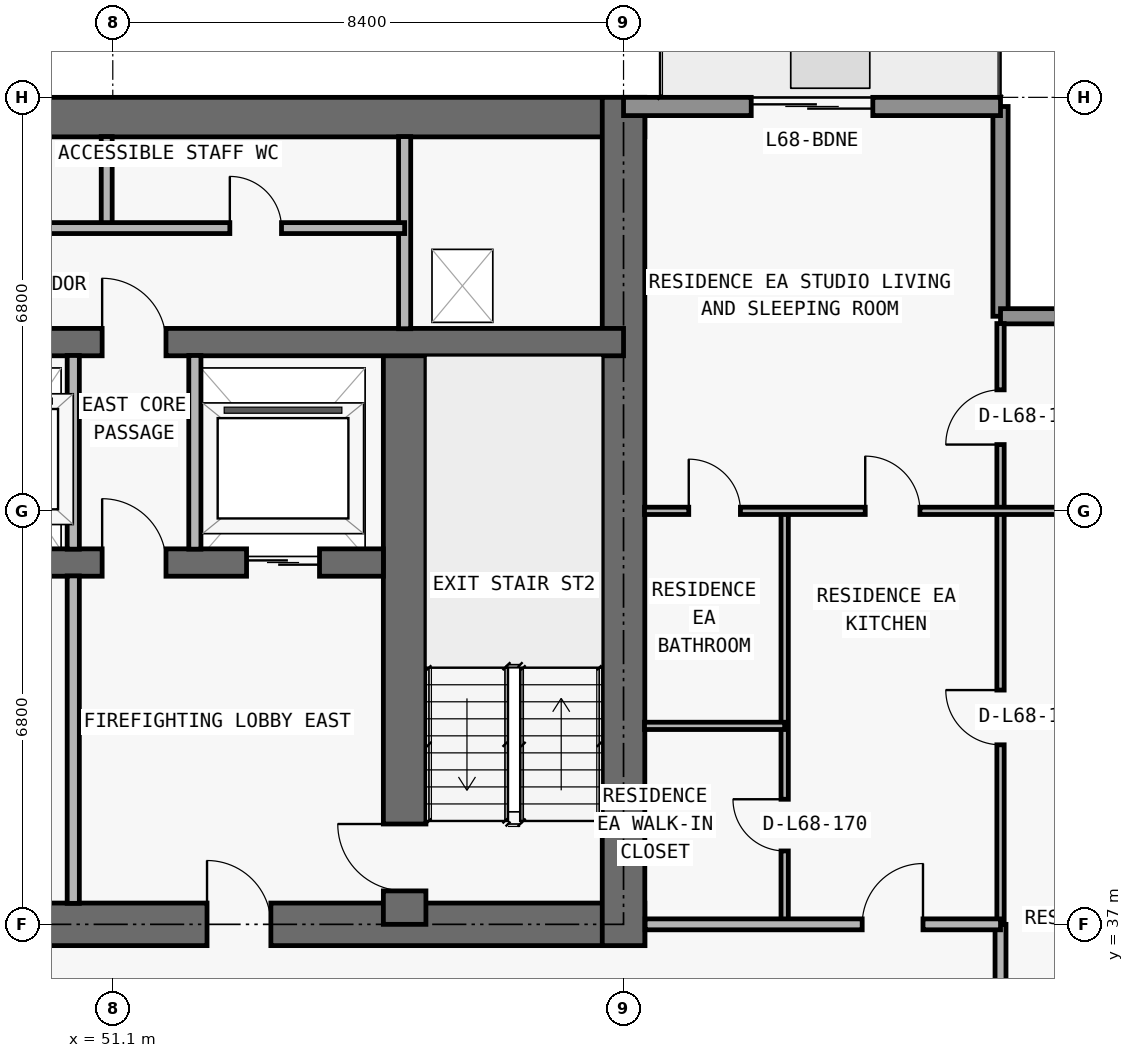
"""IFC4 building model, lengths in metres.
Left out: names, types, materials, properties, quantities, classifications, styles, units other than length and angle.
Written with IfcOpenShell. Run it as: python <this file> out.ifc"""

import sys

from ifc_helpers import new_model, si_unit, direction, frame, frame_2d, origin, place, context, subcontext, project, spatial, rectangle, extrude, element, fill, save


model = new_model("IFC4")
c1 = context("Model", 3, precision=1e-05, world=origin(), true_north=direction((0.0, 1.0)))
c2 = subcontext(c1, "Body", "Model", "MODEL_VIEW")
j1 = project(units=[si_unit("LENGTHUNIT", "METRE"), si_unit("PLANEANGLEUNIT", "RADIAN")], contexts=[c1])
p1 = place(None, origin())
s1 = spatial("IfcSite", under=j1, at=p1, CompositionType="ELEMENT")
p2 = place(p1, origin())
s2 = spatial("IfcBuilding", under=s1, at=p2, CompositionType="ELEMENT")
p3 = place(p2, frame((0.0, 0.0, 243.0)))
s3 = spatial("IfcBuildingStorey", under=s2, at=p3, CompositionType="ELEMENT", Elevation=243.0)
p4 = place(p3, frame((17.95, 37.0, 0.0), z_axis=(0.0, 0.0, 1.0), x_axis=(1.0, 0.0, 0.0)))
e1 = element("IfcWall", 1, at=p4, inside=s3, PredefinedType="SHEAR", context=c2, shape_type="SweptSolid", body=[
    extrude(rectangle(XDim=41.9, YDim=0.7, at=frame_2d((20.95, 0.0))), origin(), (0.0, 0.0, 1.0), 3.05),
])
p5 = place(p4, frame((14.35, 0.0, 0.0)))
e2 = element("IfcOpeningElement", 2, at=p5, cuts=e1, PredefinedType="OPENING", context=c2, shape_type="SweptSolid", body=[
    extrude(rectangle(XDim=1.1, YDim=2.15, at=frame_2d((0.55, 1.075))), frame((0.0, 0.36, 0.0), z_axis=(0.0, -1.0, 0.0), x_axis=(1.0, 0.0, 0.0)), (0.0, 0.0, 1.0), 0.72),
])
p6 = place(p4, frame((6.2, 0.0, 0.0)))
e3 = element("IfcOpeningElement", 3, at=p6, cuts=e1, PredefinedType="OPENING", context=c2, shape_type="SweptSolid", body=[
    extrude(rectangle(XDim=1.05, YDim=2.15, at=frame_2d((0.525, 1.075))), frame((0.0, 0.36, 0.0), z_axis=(0.0, -1.0, 0.0), x_axis=(1.0, 0.0, 0.0)), (0.0, 0.0, 1.0), 0.72),
])
p7 = place(p4, frame((34.7, 0.0, 0.0)))
e4 = element("IfcOpeningElement", 4, at=p7, cuts=e1, PredefinedType="OPENING", context=c2, shape_type="SweptSolid", body=[
    extrude(rectangle(XDim=1.05, YDim=2.15, at=frame_2d((0.525, 1.075))), frame((0.0, 0.36, 0.0), z_axis=(0.0, -1.0, 0.0), x_axis=(1.0, 0.0, 0.0)), (0.0, 0.0, 1.0), 0.72),
])
p8 = place(p4, frame((10.812, 0.0, 0.0)))
e5 = element("IfcOpeningElement", 5, at=p8, cuts=e1, PredefinedType="OPENING", context=c2, shape_type="SweptSolid", body=[
    extrude(rectangle(XDim=1.05, YDim=2.15, at=frame_2d((0.525, 1.075))), frame((0.0, 0.36, 0.0), z_axis=(0.0, -1.0, 0.0), x_axis=(1.0, 0.0, 0.0)), (0.0, 0.0, 1.0), 0.72),
])
p9 = place(p4, frame((24.05, 0.0, 0.0)))
e6 = element("IfcOpeningElement", 6, at=p9, cuts=e1, PredefinedType="OPENING", context=c2, shape_type="SweptSolid", body=[
    extrude(rectangle(XDim=1.05, YDim=2.15, at=frame_2d((0.525, 1.075))), frame((0.0, 0.36, 0.0), z_axis=(0.0, -1.0, 0.0), x_axis=(1.0, 0.0, 0.0)), (0.0, 0.0, 1.0), 0.72),
])
p10 = place(p3, frame((17.95, 50.275, 0.0), z_axis=(0.0, 0.0, 1.0), x_axis=(1.0, 0.0, 0.0)))
e7 = element("IfcWall", 7, at=p10, inside=s3, PredefinedType="SHEAR", context=c2, shape_type="SweptSolid", body=[
    extrude(rectangle(XDim=41.9, YDim=0.65, at=frame_2d((20.95, 0.0))), origin(), (0.0, 0.0, 1.0), 3.05),
])
p11 = place(p3, frame((59.5, 36.65, 0.0), z_axis=(0.0, 0.0, 1.0), x_axis=(0.0, 1.0, 0.0)))
e8 = element("IfcWall", 8, at=p11, inside=s3, PredefinedType="SHEAR", context=c2, shape_type="SweptSolid", body=[
    extrude(rectangle(XDim=13.95, YDim=0.7, at=frame_2d((6.975, 0.0))), origin(), (0.0, 0.0, 1.0), 3.05),
])
p12 = place(p3, frame((55.9, 37.0, 0.0), z_axis=(0.0, 0.0, 1.0), x_axis=(0.0, 1.0, 0.0)))
e9 = element("IfcWall", 9, at=p12, inside=s3, PredefinedType="SHEAR", context=c2, shape_type="SweptSolid", body=[
    extrude(rectangle(XDim=9.575, YDim=0.7, at=frame_2d((4.788, 0.0))), origin(), (0.0, 0.0, 1.0), 3.05),
])
p13 = place(p12, frame((0.55, 0.0, 0.0)))
e10 = element("IfcOpeningElement", 10, at=p13, cuts=e9, PredefinedType="OPENING", context=c2, shape_type="SweptSolid", body=[
    extrude(rectangle(XDim=1.1, YDim=2.15, at=frame_2d((0.55, 1.075))), frame((0.0, 0.36, 0.0), z_axis=(0.0, -1.0, 0.0), x_axis=(1.0, 0.0, 0.0)), (0.0, 0.0, 1.0), 0.72),
])
p14 = place(p3, frame((22.25, 42.95, 0.0), z_axis=(0.0, 0.0, 1.0), x_axis=(1.0, 0.0, 0.0)))
e11 = element("IfcWall", 11, at=p14, inside=s3, PredefinedType="SHEAR", context=c2, shape_type="SweptSolid", body=[
    extrude(rectangle(XDim=33.3, YDim=0.45, at=frame_2d((16.65, 0.0))), origin(), (0.0, 0.0, 1.0), 3.05),
])
p15 = place(p14, frame((1.05, 0.0, 0.0)))
e12 = element("IfcOpeningElement", 12, at=p15, cuts=e11, PredefinedType="OPENING", context=c2, shape_type="SweptSolid", body=[
    extrude(rectangle(XDim=1.2, YDim=2.2, at=frame_2d((0.6, 1.1))), frame((0.0, 0.235, 0.0), z_axis=(0.0, -1.0, 0.0), x_axis=(1.0, 0.0, 0.0)), (0.0, 0.0, 1.0), 0.47),
])
p16 = place(p14, frame((31.05, 0.0, 0.0)))
e13 = element("IfcOpeningElement", 13, at=p16, cuts=e11, PredefinedType="OPENING", context=c2, shape_type="SweptSolid", body=[
    extrude(rectangle(XDim=1.2, YDim=2.2, at=frame_2d((0.6, 1.1))), frame((0.0, 0.235, 0.0), z_axis=(0.0, -1.0, 0.0), x_axis=(1.0, 0.0, 0.0)), (0.0, 0.0, 1.0), 0.47),
])
p17 = place(p14, frame((26.45, 0.0, 0.0)))
e14 = element("IfcOpeningElement", 14, at=p17, cuts=e11, PredefinedType="OPENING", context=c2, shape_type="SweptSolid", body=[
    extrude(rectangle(XDim=1.1, YDim=2.2, at=frame_2d((0.55, 1.1))), frame((0.0, 0.235, 0.0), z_axis=(0.0, -1.0, 0.0), x_axis=(1.0, 0.0, 0.0)), (0.0, 0.0, 1.0), 0.47),
])
p18 = place(p14, frame((5.95, 0.0, 0.0)))
e15 = element("IfcOpeningElement", 15, at=p18, cuts=e11, PredefinedType="OPENING", context=c2, shape_type="SweptSolid", body=[
    extrude(rectangle(XDim=1.1, YDim=2.2, at=frame_2d((0.55, 1.1))), frame((0.0, 0.235, 0.0), z_axis=(0.0, -1.0, 0.0), x_axis=(1.0, 0.0, 0.0)), (0.0, 0.0, 1.0), 0.47),
])
p19 = place(p14, frame((3.625, 0.0, 0.0)))
e16 = element("IfcOpeningElement", 16, at=p19, cuts=e11, PredefinedType="OPENING", context=c2, shape_type="SweptSolid", body=[
    extrude(rectangle(XDim=1.05, YDim=2.15, at=frame_2d((0.525, 1.075))), frame((0.0, 0.235, 0.0), z_axis=(0.0, -1.0, 0.0), x_axis=(1.0, 0.0, 0.0)), (0.0, 0.0, 1.0), 0.47),
])
p20 = place(p14, frame((28.675, 0.0, 0.0)))
e17 = element("IfcOpeningElement", 17, at=p20, cuts=e11, PredefinedType="OPENING", context=c2, shape_type="SweptSolid", body=[
    extrude(rectangle(XDim=1.05, YDim=2.15, at=frame_2d((0.525, 1.075))), frame((0.0, 0.235, 0.0), z_axis=(0.0, -1.0, 0.0), x_axis=(1.0, 0.0, 0.0)), (0.0, 0.0, 1.0), 0.47),
])
p21 = place(p14, frame((14.7, 0.0, 0.0)))
e18 = element("IfcOpeningElement", 18, at=p21, cuts=e11, PredefinedType="OPENING", context=c2, shape_type="SweptSolid", body=[
    extrude(rectangle(XDim=1.0, YDim=2.2, at=frame_2d((0.5, 1.1))), frame((0.0, 0.235, 0.0), z_axis=(0.0, -1.0, 0.0), x_axis=(1.0, 0.0, 0.0)), (0.0, 0.0, 1.0), 0.47),
])
p22 = place(p14, frame((21.45, 0.0, 0.0)))
e19 = element("IfcOpeningElement", 19, at=p22, cuts=e11, PredefinedType="OPENING", context=c2, shape_type="SweptSolid", body=[
    extrude(rectangle(XDim=1.0, YDim=2.2, at=frame_2d((0.5, 1.1))), frame((0.0, 0.235, 0.0), z_axis=(0.0, -1.0, 0.0), x_axis=(1.0, 0.0, 0.0)), (0.0, 0.0, 1.0), 0.47),
])
p23 = place(p3, frame((18.3, 46.575, 0.0), z_axis=(0.0, 0.0, 1.0), x_axis=(1.0, 0.0, 0.0)))
e20 = element("IfcWall", 20, at=p23, inside=s3, PredefinedType="SHEAR", context=c2, shape_type="SweptSolid", body=[
    extrude(rectangle(XDim=41.2, YDim=0.45, at=frame_2d((20.6, 0.0))), origin(), (0.0, 0.0, 1.0), 3.05),
])
p24 = place(p23, frame((7.6, 0.0, 0.0)))
e21 = element("IfcOpeningElement", 21, at=p24, cuts=e20, PredefinedType="OPENING", context=c2, shape_type="SweptSolid", body=[
    extrude(rectangle(XDim=1.0, YDim=2.2, at=frame_2d((0.5, 1.1))), frame((0.0, 0.235, 0.0), z_axis=(0.0, -1.0, 0.0), x_axis=(1.0, 0.0, 0.0)), (0.0, 0.0, 1.0), 0.47),
])
p25 = place(p23, frame((32.625, 0.0, 0.0)))
e22 = element("IfcOpeningElement", 22, at=p25, cuts=e20, PredefinedType="OPENING", context=c2, shape_type="SweptSolid", body=[
    extrude(rectangle(XDim=1.05, YDim=2.15, at=frame_2d((0.525, 1.075))), frame((0.0, 0.235, 0.0), z_axis=(0.0, -1.0, 0.0), x_axis=(1.0, 0.0, 0.0)), (0.0, 0.0, 1.0), 0.47),
])
p26 = place(p3, frame((65.7, 50.45, 0.0), z_axis=(0.0, 0.0, 1.0), x_axis=(0.0, -1.0, 0.0)))
e23 = element("IfcWall", 23, at=p26, inside=s3, PredefinedType="ELEMENTEDWALL", context=c2, shape_type="SweptSolid", body=[
    extrude(rectangle(XDim=3.45, YDim=0.25, at=frame_2d((1.725, 0.0))), origin(), (0.0, 0.0, 1.0), 3.05),
])
p27 = place(p3, frame((65.7, 47.0, 0.0), z_axis=(0.0, 0.0, 1.0), x_axis=(1.0, 0.0, 0.0)))
e24 = element("IfcWall", 24, at=p27, inside=s3, PredefinedType="ELEMENTEDWALL", context=c2, shape_type="SweptSolid", body=[
    extrude(rectangle(XDim=3.85, YDim=0.25, at=frame_2d((1.925, 0.0))), origin(), (0.0, 0.0, 1.0), 3.05),
])
p28 = place(p3, frame((59.5, 50.45, 0.0), z_axis=(0.0, 0.0, 1.0), x_axis=(1.0, 0.0, 0.0)))
e25 = element("IfcWall", 25, at=p28, inside=s3, PredefinedType="STANDARD", context=c2, shape_type="SweptSolid", body=[
    extrude(rectangle(XDim=6.2, YDim=0.3, at=frame_2d((3.1, 0.0))), origin(), (0.0, 0.0, 1.0), 3.05),
])
p29 = place(p28, frame((2.1, 0.0, 0.0)))
e26 = element("IfcOpeningElement", 26, at=p29, cuts=e25, PredefinedType="OPENING", context=c2, shape_type="SweptSolid", body=[
    extrude(rectangle(XDim=2.0, YDim=2.3, at=frame_2d((1.0, 1.15))), frame((0.0, 0.16, 0.0), z_axis=(0.0, -1.0, 0.0), x_axis=(1.0, 0.0, 0.0)), (0.0, 0.0, 1.0), 0.32),
])
p30 = place(p3, frame((50.45, 37.345, 0.0), z_axis=(0.0, 0.0, 1.0), x_axis=(0.0, 1.0, 0.0)))
e27 = element("IfcWall", 27, at=p30, inside=s3, PredefinedType="PARTITIONING", context=c2, shape_type="SweptSolid", body=[
    extrude(rectangle(XDim=5.385, YDim=0.2, at=frame_2d((2.692, 0.0))), origin(), (0.0, 0.0, 1.0), 3.05),
])
p31 = place(p3, frame((50.45, 43.17, 0.0), z_axis=(0.0, 0.0, 1.0), x_axis=(0.0, 1.0, 0.0)))
e28 = element("IfcWall", 28, at=p31, inside=s3, PredefinedType="PARTITIONING", context=c2, shape_type="SweptSolid", body=[
    extrude(rectangle(XDim=3.185, YDim=0.2, at=frame_2d((1.593, 0.0))), origin(), (0.0, 0.0, 1.0), 3.05),
])
p32 = place(p3, frame((51.0, 48.45, 0.0), z_axis=(0.0, 0.0, 1.0), x_axis=(0.0, 1.0, 0.0)))
e29 = element("IfcWall", 29, at=p32, inside=s3, PredefinedType="PARTITIONING", context=c2, shape_type="SweptSolid", body=[
    extrude(rectangle(XDim=1.505, YDim=0.18, at=frame_2d((0.752, 0.0))), origin(), (0.0, 0.0, 1.0), 3.05),
])
p33 = place(p3, frame((52.45, 43.17, 0.0), z_axis=(0.0, 0.0, 1.0), x_axis=(0.0, 1.0, 0.0)))
e30 = element("IfcWall", 30, at=p33, inside=s3, PredefinedType="PARTITIONING", context=c2, shape_type="SweptSolid", body=[
    extrude(rectangle(XDim=3.185, YDim=0.2, at=frame_2d((1.593, 0.0))), origin(), (0.0, 0.0, 1.0), 3.05),
])
p34 = place(p3, frame((55.9, 46.795, 0.0), z_axis=(0.0, 0.0, 1.0), x_axis=(0.0, 1.0, 0.0)))
e31 = element("IfcWall", 31, at=p34, inside=s3, PredefinedType="PARTITIONING", context=c2, shape_type="SweptSolid", body=[
    extrude(rectangle(XDim=3.16, YDim=0.2, at=frame_2d((1.58, 0.0))), origin(), (0.0, 0.0, 1.0), 3.05),
])
p35 = place(p3, frame((62.15, 37.0, 0.0), z_axis=(0.0, 0.0, 1.0), x_axis=(0.0, 1.0, 0.0)))
e32 = element("IfcWall", 32, at=p35, inside=s3, PredefinedType="PARTITIONING", context=c2, shape_type="SweptSolid", body=[
    extrude(rectangle(XDim=6.8, YDim=0.12, at=frame_2d((3.4, 0.0))), origin(), (0.0, 0.0, 1.0), 2.679),
])
p36 = place(p35, frame((1.207, 0.0, 0.0)))
e33 = element("IfcOpeningElement", 33, at=p36, cuts=e32, PredefinedType="OPENING", context=c2, shape_type="SweptSolid", body=[
    extrude(rectangle(XDim=0.85, YDim=2.1, at=frame_2d((0.425, 1.05))), frame((0.0, 0.07, 0.0), z_axis=(0.0, -1.0, 0.0), x_axis=(1.0, 0.0, 0.0)), (0.0, 0.0, 1.0), 0.14),
])
p37 = place(p3, frame((65.7, 33.705, 0.0), z_axis=(0.0, 0.0, 1.0), x_axis=(0.0, 1.0, 0.0)))
e34 = element("IfcWall", 34, at=p37, inside=s3, PredefinedType="PARTITIONING", context=c2, shape_type="SweptSolid", body=[
    extrude(rectangle(XDim=3.295, YDim=0.18, at=frame_2d((1.647, 0.0))), origin(), (0.0, 0.0, 1.0), 3.05),
])
p38 = place(p3, frame((65.7, 37.005, 0.0), z_axis=(0.0, 0.0, 1.0), x_axis=(0.0, 1.0, 0.0)))
e35 = element("IfcWall", 35, at=p38, inside=s3, PredefinedType="PARTITIONING", context=c2, shape_type="SweptSolid", body=[
    extrude(rectangle(XDim=9.875, YDim=0.12, at=frame_2d((4.938, 0.0))), origin(), (0.0, 0.0, 1.0), 3.05),
])
p39 = place(p38, frame((2.948, 0.0, 0.0)))
e36 = element("IfcOpeningElement", 36, at=p39, cuts=e35, PredefinedType="OPENING", context=c2, shape_type="SweptSolid", body=[
    extrude(rectangle(XDim=0.9, YDim=2.15, at=frame_2d((0.45, 1.075))), frame((0.0, 0.07, 0.0), z_axis=(0.0, -1.0, 0.0), x_axis=(1.0, 0.0, 0.0)), (0.0, 0.0, 1.0), 0.14),
])
p40 = place(p38, frame((7.885, 0.0, 0.0)))
e37 = element("IfcOpeningElement", 37, at=p40, cuts=e35, PredefinedType="OPENING", context=c2, shape_type="SweptSolid", body=[
    extrude(rectangle(XDim=0.9, YDim=2.15, at=frame_2d((0.45, 1.075))), frame((0.0, 0.07, 0.0), z_axis=(0.0, -1.0, 0.0), x_axis=(1.0, 0.0, 0.0)), (0.0, 0.0, 1.0), 0.14),
])
p41 = place(p3, frame((59.855, 37.0, 0.0), z_axis=(0.0, 0.0, 1.0), x_axis=(1.0, 0.0, 0.0)))
e38 = element("IfcWall", 38, at=p41, inside=s3, PredefinedType="PARTITIONING", context=c2, shape_type="SweptSolid", body=[
    extrude(rectangle(XDim=5.845, YDim=0.18, at=frame_2d((2.922, 0.0))), origin(), (0.0, 0.0, 1.0), 3.05),
])
p42 = place(p41, frame((3.57, 0.0, 0.0)))
e39 = element("IfcOpeningElement", 39, at=p42, cuts=e38, PredefinedType="OPENING", context=c2, shape_type="SweptSolid", body=[
    extrude(rectangle(XDim=1.0, YDim=2.2, at=frame_2d((0.5, 1.1))), frame((0.0, 0.1, 0.0), z_axis=(0.0, -1.0, 0.0), x_axis=(1.0, 0.0, 0.0)), (0.0, 0.0, 1.0), 0.2),
])
p43 = place(p3, frame((59.845, 40.264, 0.0), z_axis=(0.0, 0.0, 1.0), x_axis=(1.0, 0.0, 0.0)))
e40 = element("IfcWall", 40, at=p43, inside=s3, PredefinedType="PARTITIONING", context=c2, shape_type="SweptSolid", body=[
    extrude(rectangle(XDim=2.305, YDim=0.12, at=frame_2d((1.152, 0.0))), origin(), (0.0, 0.0, 1.0), 3.05),
])
p44 = place(p3, frame((59.845, 43.8, 0.0), z_axis=(0.0, 0.0, 1.0), x_axis=(1.0, 0.0, 0.0)))
e41 = element("IfcWall", 41, at=p44, inside=s3, PredefinedType="PARTITIONING", context=c2, shape_type="SweptSolid", body=[
    extrude(rectangle(XDim=9.56, YDim=0.12, at=frame_2d((4.78, 0.0))), origin(), (0.0, 0.0, 1.0), 2.418),
])
p45 = place(p44, frame((3.63, 0.0, 0.0)))
e42 = element("IfcOpeningElement", 42, at=p45, cuts=e41, PredefinedType="OPENING", context=c2, shape_type="SweptSolid", body=[
    extrude(rectangle(XDim=0.9, YDim=2.15, at=frame_2d((0.45, 1.075))), frame((0.0, 0.07, 0.0), z_axis=(0.0, -1.0, 0.0), x_axis=(1.0, 0.0, 0.0)), (0.0, 0.0, 1.0), 0.14),
])
p46 = place(p44, frame((0.728, 0.0, 0.0)))
e43 = element("IfcOpeningElement", 43, at=p46, cuts=e41, PredefinedType="OPENING", context=c2, shape_type="SweptSolid", body=[
    extrude(rectangle(XDim=0.85, YDim=2.1, at=frame_2d((0.425, 1.05))), frame((0.0, 0.07, 0.0), z_axis=(0.0, -1.0, 0.0), x_axis=(1.0, 0.0, 0.0)), (0.0, 0.0, 1.0), 0.14),
])
p47 = place(p3, frame((41.2, 48.45, 0.0), z_axis=(0.0, 0.0, 1.0), x_axis=(1.0, 0.0, 0.0)))
e44 = element("IfcWall", 44, at=p47, inside=s3, PredefinedType="PARTITIONING", context=c2, shape_type="SweptSolid", body=[
    extrude(rectangle(XDim=14.7, YDim=0.18, at=frame_2d((7.35, 0.0))), origin(), (0.0, 0.0, 1.0), 3.05),
])
p48 = place(p47, frame((1.85, 0.0, 0.0)))
e45 = element("IfcOpeningElement", 45, at=p48, cuts=e44, PredefinedType="OPENING", context=c2, shape_type="SweptSolid", body=[
    extrude(rectangle(XDim=1.2, YDim=2.2, at=frame_2d((0.6, 1.1))), frame((0.0, 0.1, 0.0), z_axis=(0.0, -1.0, 0.0), x_axis=(1.0, 0.0, 0.0)), (0.0, 0.0, 1.0), 0.2),
])
p49 = place(p47, frame((6.75, 0.0, 0.0)))
e46 = element("IfcOpeningElement", 46, at=p49, cuts=e44, PredefinedType="OPENING", context=c2, shape_type="SweptSolid", body=[
    extrude(rectangle(XDim=1.2, YDim=2.2, at=frame_2d((0.6, 1.1))), frame((0.0, 0.1, 0.0), z_axis=(0.0, -1.0, 0.0), x_axis=(1.0, 0.0, 0.0)), (0.0, 0.0, 1.0), 0.2),
])
p50 = place(p47, frame((11.825, 0.0, 0.0)))
e47 = element("IfcOpeningElement", 47, at=p50, cuts=e44, PredefinedType="OPENING", context=c2, shape_type="SweptSolid", body=[
    extrude(rectangle(XDim=0.85, YDim=2.1, at=frame_2d((0.425, 1.05))), frame((0.0, 0.1, 0.0), z_axis=(0.0, -1.0, 0.0), x_axis=(1.0, 0.0, 0.0)), (0.0, 0.0, 1.0), 0.2),
])
p51 = place(p29, origin())
e48 = element("IfcDoor", 48, at=p51, inside=s3, OperationType="DOUBLE_DOOR_SLIDING", PredefinedType="DOOR", context=c2, shape_type="SweptSolid", body=[
    extrude(rectangle(XDim=2.0, YDim=2.3, at=frame_2d((1.0, 1.15))), frame((0.0, 0.025, 0.0), z_axis=(0.0, -1.0, 0.0), x_axis=(1.0, 0.0, 0.0)), (0.0, 0.0, 1.0), 0.05),
])
fill(e26, e48)
p52 = place(p16, origin())
e49 = element("IfcDoor", 49, at=p52, inside=s3, OperationType="DOUBLE_DOOR_SLIDING", PredefinedType="DOOR", context=c2, shape_type="SweptSolid", body=[
    extrude(rectangle(XDim=1.2, YDim=2.2, at=frame_2d((0.6, 1.1))), frame((0.0, 0.025, 0.0), z_axis=(0.0, -1.0, 0.0), x_axis=(1.0, 0.0, 0.0)), (0.0, 0.0, 1.0), 0.05),
])
fill(e13, e49)
p53 = place(p7, origin())
e50 = element("IfcDoor", 50, at=p53, inside=s3, OperationType="SINGLE_SWING_LEFT", PredefinedType="DOOR", context=c2, shape_type="SweptSolid", body=[
    extrude(rectangle(XDim=1.05, YDim=2.15, at=frame_2d((0.525, 1.075))), frame((0.0, 0.025, 0.0), z_axis=(0.0, -1.0, 0.0), x_axis=(1.0, 0.0, 0.0)), (0.0, 0.0, 1.0), 0.05),
])
fill(e4, e50)
p54 = place(p13, origin())
e51 = element("IfcDoor", 51, at=p54, inside=s3, OperationType="SINGLE_SWING_RIGHT", PredefinedType="DOOR", context=c2, shape_type="SweptSolid", body=[
    extrude(rectangle(XDim=1.1, YDim=2.15, at=frame_2d((0.55, 1.075))), frame((0.0, 0.025, 0.0), z_axis=(0.0, -1.0, 0.0), x_axis=(1.0, 0.0, 0.0)), (0.0, 0.0, 1.0), 0.05),
])
fill(e10, e51)
p55 = place(p20, origin())
e52 = element("IfcDoor", 52, at=p55, inside=s3, OperationType="SINGLE_SWING_LEFT", PredefinedType="DOOR", context=c2, shape_type="SweptSolid", body=[
    extrude(rectangle(XDim=1.05, YDim=2.15, at=frame_2d((0.525, 1.075))), frame((0.0, 0.025, 0.0), z_axis=(0.0, -1.0, 0.0), x_axis=(1.0, 0.0, 0.0)), (0.0, 0.0, 1.0), 0.05),
])
fill(e17, e52)
p56 = place(p25, origin())
e53 = element("IfcDoor", 53, at=p56, inside=s3, OperationType="SINGLE_SWING_LEFT", PredefinedType="DOOR", context=c2, shape_type="SweptSolid", body=[
    extrude(rectangle(XDim=1.05, YDim=2.15, at=frame_2d((0.525, 1.075))), frame((0.0, 0.025, 0.0), z_axis=(0.0, -1.0, 0.0), x_axis=(1.0, 0.0, 0.0)), (0.0, 0.0, 1.0), 0.05),
])
fill(e22, e53)
p57 = place(p50, origin())
e54 = element("IfcDoor", 54, at=p57, inside=s3, OperationType="SINGLE_SWING_LEFT", PredefinedType="DOOR", context=c2, shape_type="SweptSolid", body=[
    extrude(rectangle(XDim=0.85, YDim=2.1, at=frame_2d((0.425, 1.05))), frame((0.0, 0.025, 0.0), z_axis=(0.0, -1.0, 0.0), x_axis=(1.0, 0.0, 0.0)), (0.0, 0.0, 1.0), 0.05),
])
fill(e47, e54)
p58 = place(p42, origin())
e55 = element("IfcDoor", 55, at=p58, inside=s3, OperationType="SINGLE_SWING_RIGHT", PredefinedType="DOOR", context=c2, shape_type="SweptSolid", body=[
    extrude(rectangle(XDim=1.0, YDim=2.2, at=frame_2d((0.5, 1.1))), frame((0.0, 0.025, 0.0), z_axis=(0.0, -1.0, 0.0), x_axis=(1.0, 0.0, 0.0)), (0.0, 0.0, 1.0), 0.05),
])
fill(e39, e55)
p59 = place(p45, origin())
e56 = element("IfcDoor", 56, at=p59, inside=s3, OperationType="SINGLE_SWING_LEFT", PredefinedType="DOOR", context=c2, shape_type="SweptSolid", body=[
    extrude(rectangle(XDim=0.9, YDim=2.15, at=frame_2d((0.45, 1.075))), frame((0.0, 0.025, 0.0), z_axis=(0.0, -1.0, 0.0), x_axis=(1.0, 0.0, 0.0)), (0.0, 0.0, 1.0), 0.05),
])
fill(e42, e56)
p60 = place(p36, origin())
e57 = element("IfcDoor", 57, at=p60, inside=s3, OperationType="SINGLE_SWING_RIGHT", PredefinedType="DOOR", context=c2, shape_type="SweptSolid", body=[
    extrude(rectangle(XDim=0.85, YDim=2.1, at=frame_2d((0.425, 1.05))), frame((0.0, 0.025, 0.0), z_axis=(0.0, -1.0, 0.0), x_axis=(1.0, 0.0, 0.0)), (0.0, 0.0, 1.0), 0.05),
])
fill(e33, e57)
p61 = place(p46, origin())
e58 = element("IfcDoor", 58, at=p61, inside=s3, OperationType="SINGLE_SWING_LEFT", PredefinedType="DOOR", context=c2, shape_type="SweptSolid", body=[
    extrude(rectangle(XDim=0.85, YDim=2.1, at=frame_2d((0.425, 1.05))), frame((0.0, 0.025, 0.0), z_axis=(0.0, -1.0, 0.0), x_axis=(1.0, 0.0, 0.0)), (0.0, 0.0, 1.0), 0.05),
])
fill(e43, e58)
p62 = place(p39, origin())
e59 = element("IfcDoor", 59, at=p62, inside=s3, OperationType="SINGLE_SWING_RIGHT", PredefinedType="DOOR", context=c2, shape_type="SweptSolid", body=[
    extrude(rectangle(XDim=0.9, YDim=2.15, at=frame_2d((0.45, 1.075))), frame((0.0, 0.025, 0.0), z_axis=(0.0, -1.0, 0.0), x_axis=(1.0, 0.0, 0.0)), (0.0, 0.0, 1.0), 0.05),
])
fill(e36, e59)
p63 = place(p40, origin())
e60 = element("IfcDoor", 60, at=p63, inside=s3, OperationType="SINGLE_SWING_LEFT", PredefinedType="DOOR", context=c2, shape_type="SweptSolid", body=[
    extrude(rectangle(XDim=0.9, YDim=2.15, at=frame_2d((0.45, 1.075))), frame((0.0, 0.025, 0.0), z_axis=(0.0, -1.0, 0.0), x_axis=(1.0, 0.0, 0.0)), (0.0, 0.0, 1.0), 0.05),
])
fill(e37, e60)
save(model, sys.argv[1])
